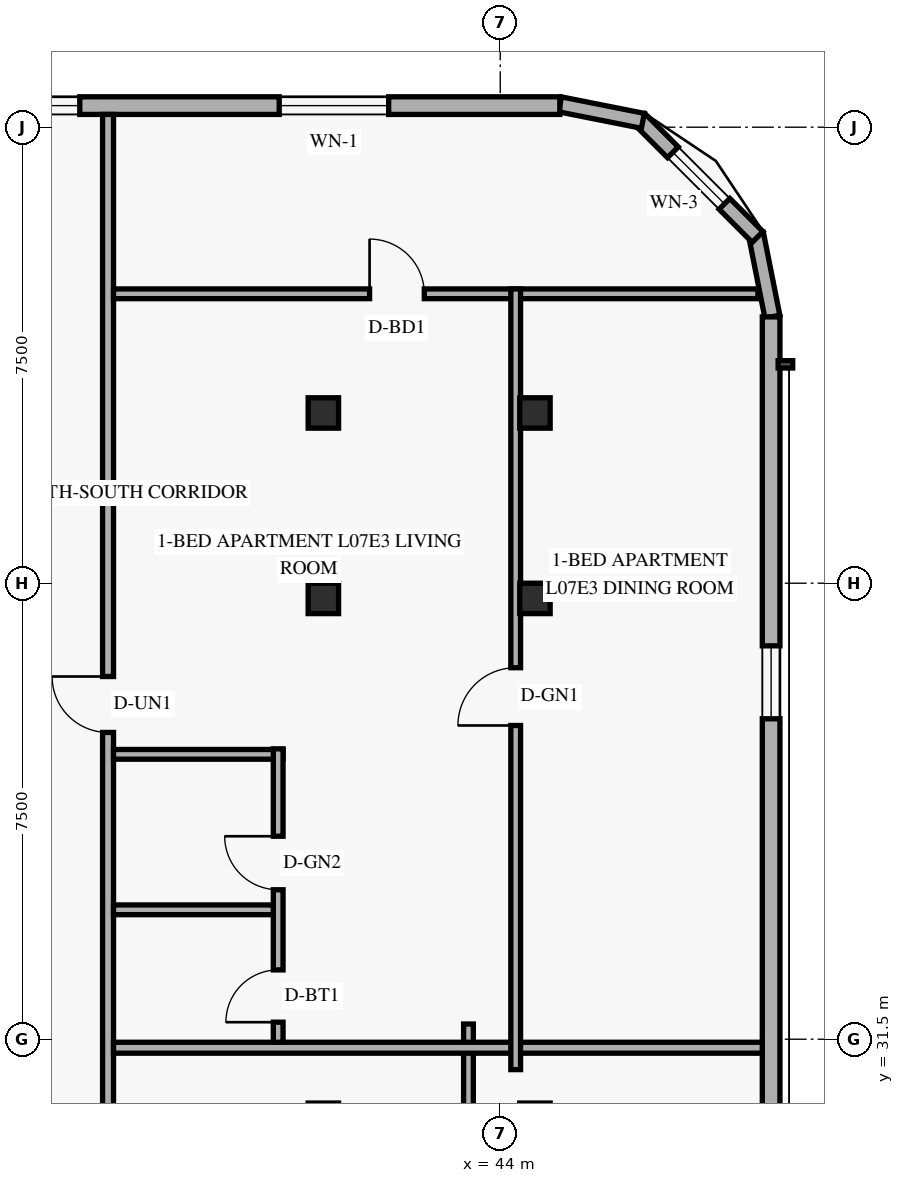
"""IFC4 building model, lengths in metres.
Left out: names, types, materials, properties, quantities, classifications, styles, units other than length and angle.
Written with IfcOpenShell. Run it as: python <this file> out.ifc"""

import sys

from ifc_helpers import new_model, si_unit, direction, frame, frame_2d, origin, origin_2d, place, context, subcontext, project, spatial, rectangle, hollow_rectangle, extrude, element, fill, save


model = new_model("IFC4")
c1 = context("Model", 3, precision=1e-05, world=origin(), true_north=direction((0.0, 1.0)))
c2 = subcontext(c1, "Body", "Model", "MODEL_VIEW")
j1 = project(units=[si_unit("LENGTHUNIT", "METRE"), si_unit("PLANEANGLEUNIT", "RADIAN")], contexts=[c1])
p1 = place(None, origin())
s1 = spatial("IfcSite", under=j1, at=p1, CompositionType="ELEMENT")
p2 = place(p1, origin())
s2 = spatial("IfcBuilding", under=s1, at=p2, CompositionType="ELEMENT")
p3 = place(p2, frame((0.0, 0.0, 31.2)))
s3 = spatial("IfcBuildingStorey", under=s2, at=p3, CompositionType="ELEMENT", Elevation=31.2)
for number, where, z_axis, x_axis in (
    (1, (41.028, 38.75, 0.0), (0.035, 0.0, 0.999), (0.0, 1.0, 0.0)),
    (2, (41.028, 41.8, 0.0), (0.035, 0.0, 0.999), (0.0, 1.0, 0.0)),
):
    element("IfcColumn", number, at=place(p3, frame(where, z_axis=z_axis, x_axis=x_axis)), inside=s3, PredefinedType="COLUMN", context=c2, shape_type="SweptSolid", body=[
        extrude(hollow_rectangle(XDim=0.5, YDim=0.5, WallThickness=0.022, at=origin_2d()), origin(), (0.0, 0.0, 1.0), 3.602),
    ])
for number, where, z_axis, x_axis in (
    (3, (44.466, 38.75, 0.0), (0.058, 0.0, 0.998), (0.0, 1.0, 0.0)),
    (4, (44.466, 41.8, 0.0), (0.058, 0.0, 0.998), (0.0, 1.0, 0.0)),
):
    element("IfcColumn", number, at=place(p3, frame(where, z_axis=z_axis, x_axis=x_axis)), inside=s3, PredefinedType="COLUMN", context=c2, shape_type="SweptSolid", body=[
        extrude(hollow_rectangle(XDim=0.5, YDim=0.5, WallThickness=0.022, at=origin_2d()), origin(), (0.0, 0.0, 1.0), 3.606),
    ])
p4 = place(p3, frame((48.476, 43.384, 0.0), z_axis=(0.0, 0.0, 1.0), x_axis=(-0.19496651342, 0.980809899341, 0.0)))
e5 = element("IfcWall", 5, at=p4, inside=s3, PredefinedType="SOLIDWALL", context=c2, shape_type="SweptSolid", body=[
    extrude(rectangle(XDim=1.389, YDim=0.25, at=frame_2d((0.694, 0.0))), origin(), (0.0, 0.0, 1.0), 3.36),
])
p5 = place(p3, frame((48.232, 44.695, 0.0), z_axis=(0.0, 0.0, 1.0), x_axis=(-0.707106781187, 0.707106781187, 0.0)))
e6 = element("IfcWall", 6, at=p5, inside=s3, PredefinedType="SOLIDWALL", context=c2, shape_type="SweptSolid", body=[
    extrude(rectangle(XDim=2.739, YDim=0.25, at=frame_2d((1.37, 0.0))), origin(), (0.0, 0.0, 1.0), 3.36),
])
p6 = place(p5, frame((0.77, 0.0, 0.85)))
e7 = element("IfcOpeningElement", 7, at=p6, cuts=e6, PredefinedType="OPENING", context=c2, shape_type="SweptSolid", body=[
    extrude(rectangle(XDim=1.2, YDim=1.5, at=frame_2d((0.6, 0.75))), frame((0.0, 0.135, 0.0), z_axis=(0.0, -1.0, 0.0), x_axis=(1.0, 0.0, 0.0)), (0.0, 0.0, 1.0), 0.27),
])
p7 = place(p3, frame((46.345, 46.605, 0.0), z_axis=(0.0, 0.0, 1.0), x_axis=(-0.980809899341, 0.19496651342, 0.0)))
e8 = element("IfcWall", 8, at=p7, inside=s3, PredefinedType="SOLIDWALL", context=c2, shape_type="SweptSolid", body=[
    extrude(rectangle(XDim=1.389, YDim=0.25, at=frame_2d((0.694, 0.0))), origin(), (0.0, 0.0, 1.0), 3.36),
])
p8 = place(p3, frame((48.455, 4.62, 0.0), z_axis=(0.0, 0.0, 1.0), x_axis=(0.0, 1.0, 0.0)))
e9 = element("IfcWall", 9, at=p8, inside=s3, PredefinedType="SOLIDWALL", context=c2, shape_type="SweptSolid", body=[
    extrude(rectangle(XDim=38.76, YDim=0.29, at=frame_2d((19.38, 0.0))), origin(), (0.0, 0.0, 1.0), 3.36),
])
p9 = place(p8, frame((4.95, 0.0, 0.85)))
e10 = element("IfcOpeningElement", 10, at=p9, cuts=e9, PredefinedType="OPENING", context=c2, shape_type="SweptSolid", body=[
    extrude(rectangle(XDim=1.2, YDim=1.5, at=frame_2d((0.6, 0.75))), frame((0.0, 0.155, 0.0), z_axis=(0.0, -1.0, 0.0), x_axis=(1.0, 0.0, 0.0)), (0.0, 0.0, 1.0), 0.31),
])
p10 = place(p8, frame((12.654, 0.0, 0.85)))
e11 = element("IfcOpeningElement", 11, at=p10, cuts=e9, PredefinedType="OPENING", context=c2, shape_type="SweptSolid", body=[
    extrude(rectangle(XDim=1.2, YDim=1.5, at=frame_2d((0.6, 0.75))), frame((0.0, 0.155, 0.0), z_axis=(0.0, -1.0, 0.0), x_axis=(1.0, 0.0, 0.0)), (0.0, 0.0, 1.0), 0.31),
])
p11 = place(p8, frame((18.479, 0.0, 0.85)))
e12 = element("IfcOpeningElement", 12, at=p11, cuts=e9, PredefinedType="OPENING", context=c2, shape_type="SweptSolid", body=[
    extrude(rectangle(XDim=1.2, YDim=1.5, at=frame_2d((0.6, 0.75))), frame((0.0, 0.155, 0.0), z_axis=(0.0, -1.0, 0.0), x_axis=(1.0, 0.0, 0.0)), (0.0, 0.0, 1.0), 0.31),
])
p12 = place(p8, frame((24.145, 0.0, 0.85)))
e13 = element("IfcOpeningElement", 13, at=p12, cuts=e9, PredefinedType="OPENING", context=c2, shape_type="SweptSolid", body=[
    extrude(rectangle(XDim=1.2, YDim=1.5, at=frame_2d((0.6, 0.75))), frame((0.0, 0.155, 0.0), z_axis=(0.0, -1.0, 0.0), x_axis=(1.0, 0.0, 0.0)), (0.0, 0.0, 1.0), 0.31),
])
p13 = place(p8, frame((32.15, 0.0, 0.85)))
e14 = element("IfcOpeningElement", 14, at=p13, cuts=e9, PredefinedType="OPENING", context=c2, shape_type="SweptSolid", body=[
    extrude(rectangle(XDim=1.2, YDim=1.5, at=frame_2d((0.6, 0.75))), frame((0.0, 0.155, 0.0), z_axis=(0.0, -1.0, 0.0), x_axis=(1.0, 0.0, 0.0)), (0.0, 0.0, 1.0), 0.31),
])
p14 = place(p3, frame((44.98, 46.855, 0.0), z_axis=(0.0, 0.0, 1.0), x_axis=(-1.0, 0.0, 0.0)))
e15 = element("IfcWall", 15, at=p14, inside=s3, PredefinedType="SOLIDWALL", context=c2, shape_type="SweptSolid", body=[
    extrude(rectangle(XDim=39.56, YDim=0.29, at=frame_2d((19.78, 0.0))), origin(), (0.0, 0.0, 1.0), 3.36),
])
p15 = place(p14, frame((35.22, 0.0, 0.85)))
e16 = element("IfcOpeningElement", 16, at=p15, cuts=e15, PredefinedType="OPENING", context=c2, shape_type="SweptSolid", body=[
    extrude(rectangle(XDim=1.8, YDim=1.6, at=frame_2d((0.9, 0.8))), frame((0.0, 0.155, 0.0), z_axis=(0.0, -1.0, 0.0), x_axis=(1.0, 0.0, 0.0)), (0.0, 0.0, 1.0), 0.31),
])
p16 = place(p14, frame((31.18, 0.0, 0.85)))
e17 = element("IfcOpeningElement", 17, at=p16, cuts=e15, PredefinedType="OPENING", context=c2, shape_type="SweptSolid", body=[
    extrude(rectangle(XDim=1.2, YDim=1.5, at=frame_2d((0.6, 0.75))), frame((0.0, 0.155, 0.0), z_axis=(0.0, -1.0, 0.0), x_axis=(1.0, 0.0, 0.0)), (0.0, 0.0, 1.0), 0.31),
])
p17 = place(p14, frame((26.625, 0.0, 0.85)))
e18 = element("IfcOpeningElement", 18, at=p17, cuts=e15, PredefinedType="OPENING", context=c2, shape_type="SweptSolid", body=[
    extrude(rectangle(XDim=1.8, YDim=1.6, at=frame_2d((0.9, 0.8))), frame((0.0, 0.155, 0.0), z_axis=(0.0, -1.0, 0.0), x_axis=(1.0, 0.0, 0.0)), (0.0, 0.0, 1.0), 0.31),
])
p18 = place(p14, frame((21.2, 0.0, 0.85)))
e19 = element("IfcOpeningElement", 19, at=p18, cuts=e15, PredefinedType="OPENING", context=c2, shape_type="SweptSolid", body=[
    extrude(rectangle(XDim=1.8, YDim=1.6, at=frame_2d((0.9, 0.8))), frame((0.0, 0.155, 0.0), z_axis=(0.0, -1.0, 0.0), x_axis=(1.0, 0.0, 0.0)), (0.0, 0.0, 1.0), 0.31),
])
p19 = place(p14, frame((15.965, 0.0, 0.85)))
e20 = element("IfcOpeningElement", 20, at=p19, cuts=e15, PredefinedType="OPENING", context=c2, shape_type="SweptSolid", body=[
    extrude(rectangle(XDim=1.8, YDim=1.6, at=frame_2d((0.9, 0.8))), frame((0.0, 0.155, 0.0), z_axis=(0.0, -1.0, 0.0), x_axis=(1.0, 0.0, 0.0)), (0.0, 0.0, 1.0), 0.31),
])
p20 = place(p14, frame((10.73, 0.0, 0.85)))
e21 = element("IfcOpeningElement", 21, at=p20, cuts=e15, PredefinedType="OPENING", context=c2, shape_type="SweptSolid", body=[
    extrude(rectangle(XDim=1.8, YDim=1.6, at=frame_2d((0.9, 0.8))), frame((0.0, 0.155, 0.0), z_axis=(0.0, -1.0, 0.0), x_axis=(1.0, 0.0, 0.0)), (0.0, 0.0, 1.0), 0.31),
])
p21 = place(p14, frame((7.895, 0.0, 0.85)))
e22 = element("IfcOpeningElement", 22, at=p21, cuts=e15, PredefinedType="OPENING", context=c2, shape_type="SweptSolid", body=[
    extrude(rectangle(XDim=1.2, YDim=1.5, at=frame_2d((0.6, 0.75))), frame((0.0, 0.155, 0.0), z_axis=(0.0, -1.0, 0.0), x_axis=(1.0, 0.0, 0.0)), (0.0, 0.0, 1.0), 0.31),
])
p22 = place(p14, frame((2.815, 0.0, 0.85)))
e23 = element("IfcOpeningElement", 23, at=p22, cuts=e15, PredefinedType="OPENING", context=c2, shape_type="SweptSolid", body=[
    extrude(rectangle(XDim=1.8, YDim=1.6, at=frame_2d((0.9, 0.8))), frame((0.0, 0.155, 0.0), z_axis=(0.0, -1.0, 0.0), x_axis=(1.0, 0.0, 0.0)), (0.0, 0.0, 1.0), 0.31),
])
p23 = place(p3, frame((37.55, 1.29, 0.0), z_axis=(0.0, 0.0, 1.0), x_axis=(0.0, 1.0, 0.0)))
e24 = element("IfcWall", 24, at=p23, inside=s3, PredefinedType="STANDARD", context=c2, shape_type="SweptSolid", body=[
    extrude(rectangle(XDim=45.42, YDim=0.18, at=frame_2d((22.71, 0.0))), origin(), (0.0, 0.0, 1.0), 2.649),
])
p24 = place(p23, frame((8.49, 0.0, 0.0)))
e25 = element("IfcOpeningElement", 25, at=p24, cuts=e24, PredefinedType="OPENING", context=c2, shape_type="SweptSolid", body=[
    extrude(rectangle(XDim=0.92, YDim=2.15, at=frame_2d((0.46, 1.075))), frame((0.0, 0.1, 0.0), z_axis=(0.0, -1.0, 0.0), x_axis=(1.0, 0.0, 0.0)), (0.0, 0.0, 1.0), 0.2),
])
p25 = place(p23, frame((20.073, 0.0, 0.0)))
e26 = element("IfcOpeningElement", 26, at=p25, cuts=e24, PredefinedType="OPENING", context=c2, shape_type="SweptSolid", body=[
    extrude(rectangle(XDim=0.92, YDim=2.15, at=frame_2d((0.46, 1.075))), frame((0.0, 0.1, 0.0), z_axis=(0.0, -1.0, 0.0), x_axis=(1.0, 0.0, 0.0)), (0.0, 0.0, 1.0), 0.2),
])
p26 = place(p23, frame((35.256, 0.0, 0.0)))
e27 = element("IfcOpeningElement", 27, at=p26, cuts=e24, PredefinedType="OPENING", context=c2, shape_type="SweptSolid", body=[
    extrude(rectangle(XDim=0.92, YDim=2.15, at=frame_2d((0.46, 1.075))), frame((0.0, 0.1, 0.0), z_axis=(0.0, -1.0, 0.0), x_axis=(1.0, 0.0, 0.0)), (0.0, 0.0, 1.0), 0.2),
])
p27 = place(p3, frame((43.477, 27.29, 0.0), z_axis=(0.0, 0.0, 1.0), x_axis=(0.0, 1.0, 0.0)))
e28 = element("IfcWall", 28, at=p27, inside=s3, PredefinedType="PARTITIONING", context=c2, shape_type="SweptSolid", body=[
    extrude(rectangle(XDim=4.46, YDim=0.16, at=frame_2d((2.23, 0.0))), origin(), (0.0, 0.0, 1.0), 2.649),
])
p28 = place(p3, frame((37.64, 31.36, 0.0), z_axis=(0.0, 0.0, 1.0), x_axis=(1.0, 0.0, 0.0)))
e29 = element("IfcWall", 29, at=p28, inside=s3, PredefinedType="PARTITIONING", context=c2, shape_type="SweptSolid", body=[
    extrude(rectangle(XDim=10.67, YDim=0.18, at=frame_2d((5.335, 0.0))), origin(), (0.0, 0.0, 1.0), 2.649),
])
p29 = place(p3, frame((37.64, 43.76, 0.0), z_axis=(0.0, 0.0, 1.0), x_axis=(1.0, 0.0, 0.0)))
e30 = element("IfcWall", 30, at=p29, inside=s3, PredefinedType="PARTITIONING", context=c2, shape_type="SweptSolid", body=[
    extrude(rectangle(XDim=10.598, YDim=0.16, at=frame_2d((5.299, 0.0))), origin(), (0.0, 0.0, 1.0), 3.36),
])
p30 = place(p29, frame((4.211, 0.0, 0.0)))
e31 = element("IfcOpeningElement", 31, at=p30, cuts=e30, PredefinedType="OPENING", context=c2, shape_type="SweptSolid", body=[
    extrude(rectangle(XDim=0.9, YDim=2.14, at=frame_2d((0.45, 1.07))), frame((0.0, 0.09, 0.0), z_axis=(0.0, -1.0, 0.0), x_axis=(1.0, 0.0, 0.0)), (0.0, 0.0, 1.0), 0.18),
])
p31 = place(p3, frame((37.64, 36.186, 0.0), z_axis=(0.0, 0.0, 1.0), x_axis=(1.0, 0.0, 0.0)))
e32 = element("IfcWall", 32, at=p31, inside=s3, PredefinedType="PLUMBINGWALL", context=c2, shape_type="SweptSolid", body=[
    extrude(rectangle(XDim=2.788, YDim=0.16, at=frame_2d((1.394, 0.0))), origin(), (0.0, 0.0, 1.0), 3.36),
])
p32 = place(p3, frame((40.348, 31.45, 0.0), z_axis=(0.0, 0.0, 1.0), x_axis=(0.0, 1.0, 0.0)))
e33 = element("IfcWall", 33, at=p32, inside=s3, PredefinedType="PLUMBINGWALL", context=c2, shape_type="SweptSolid", body=[
    extrude(rectangle(XDim=4.825, YDim=0.16, at=frame_2d((2.413, 0.0))), origin(), (0.0, 0.0, 1.0), 2.932),
])
p33 = place(p32, frame((0.33, 0.0, 0.0)))
e34 = element("IfcOpeningElement", 34, at=p33, cuts=e33, PredefinedType="OPENING", context=c2, shape_type="SweptSolid", body=[
    extrude(rectangle(XDim=0.86, YDim=2.12, at=frame_2d((0.43, 1.06))), frame((0.0, 0.09, 0.0), z_axis=(0.0, -1.0, 0.0), x_axis=(1.0, 0.0, 0.0)), (0.0, 0.0, 1.0), 0.18),
])
p34 = place(p32, frame((2.508, 0.0, 0.0)))
e35 = element("IfcOpeningElement", 35, at=p34, cuts=e33, PredefinedType="OPENING", context=c2, shape_type="SweptSolid", body=[
    extrude(rectangle(XDim=0.88, YDim=2.12, at=frame_2d((0.44, 1.06))), frame((0.0, 0.09, 0.0), z_axis=(0.0, -1.0, 0.0), x_axis=(1.0, 0.0, 0.0)), (0.0, 0.0, 1.0), 0.18),
])
p35 = place(p3, frame((37.64, 33.628, 0.0), z_axis=(0.0, 0.0, 1.0), x_axis=(1.0, 0.0, 0.0)))
e36 = element("IfcWall", 36, at=p35, inside=s3, PredefinedType="PLUMBINGWALL", context=c2, shape_type="SweptSolid", body=[
    extrude(rectangle(XDim=2.628, YDim=0.16, at=frame_2d((1.314, 0.0))), origin(), (0.0, 0.0, 1.0), 3.36),
])
p36 = place(p3, frame((44.254, 31.0, 0.0), z_axis=(0.0, 0.0, 1.0), x_axis=(0.0, 1.0, 0.0)))
e37 = element("IfcWall", 37, at=p36, inside=s3, PredefinedType="PARTITIONING", context=c2, shape_type="SweptSolid", body=[
    extrude(rectangle(XDim=12.84, YDim=0.16, at=frame_2d((6.42, 0.0))), origin(), (0.0, 0.0, 1.0), 2.649),
])
p37 = place(p36, frame((5.66, 0.0, 0.0)))
e38 = element("IfcOpeningElement", 38, at=p37, cuts=e37, PredefinedType="OPENING", context=c2, shape_type="SweptSolid", body=[
    extrude(rectangle(XDim=0.95, YDim=2.15, at=frame_2d((0.475, 1.075))), frame((0.0, 0.09, 0.0), z_axis=(0.0, -1.0, 0.0), x_axis=(1.0, 0.0, 0.0)), (0.0, 0.0, 1.0), 0.18),
])
p38 = place(p6, origin())
e39 = element("IfcWindow", 39, at=p38, inside=s3, PartitioningType="SINGLE_PANEL", PredefinedType="WINDOW", context=c2, shape_type="SweptSolid", body=[
    extrude(rectangle(XDim=1.2, YDim=1.5, at=frame_2d((0.6, 0.75))), frame((0.0, 0.03, 0.0), z_axis=(0.0, -1.0, 0.0), x_axis=(1.0, 0.0, 0.0)), (0.0, 0.0, 1.0), 0.06),
])
fill(e7, e39)
p39 = place(p13, origin())
e40 = element("IfcWindow", 40, at=p39, inside=s3, PartitioningType="SINGLE_PANEL", PredefinedType="WINDOW", context=c2, shape_type="SweptSolid", body=[
    extrude(rectangle(XDim=1.2, YDim=1.5, at=frame_2d((0.6, 0.75))), frame((0.0, 0.03, 0.0), z_axis=(0.0, -1.0, 0.0), x_axis=(1.0, 0.0, 0.0)), (0.0, 0.0, 1.0), 0.06),
])
fill(e14, e40)
p40 = place(p21, origin())
e41 = element("IfcWindow", 41, at=p40, inside=s3, PartitioningType="SINGLE_PANEL", PredefinedType="WINDOW", context=c2, shape_type="SweptSolid", body=[
    extrude(rectangle(XDim=1.2, YDim=1.5, at=frame_2d((0.6, 0.75))), frame((0.0, 0.03, 0.0), z_axis=(0.0, -1.0, 0.0), x_axis=(1.0, 0.0, 0.0)), (0.0, 0.0, 1.0), 0.06),
])
fill(e22, e41)
p41 = place(p22, origin())
e42 = element("IfcWindow", 42, at=p41, inside=s3, PartitioningType="SINGLE_PANEL", PredefinedType="WINDOW", context=c2, shape_type="SweptSolid", body=[
    extrude(rectangle(XDim=1.8, YDim=1.6, at=frame_2d((0.9, 0.8))), frame((0.0, 0.03, 0.0), z_axis=(0.0, -1.0, 0.0), x_axis=(1.0, 0.0, 0.0)), (0.0, 0.0, 1.0), 0.06),
])
fill(e23, e42)
p42 = place(p37, origin())
e43 = element("IfcDoor", 43, at=p42, inside=s3, OperationType="SINGLE_SWING_LEFT", PredefinedType="DOOR", context=c2, shape_type="SweptSolid", body=[
    extrude(rectangle(XDim=0.95, YDim=2.15, at=frame_2d((0.475, 1.075))), frame((0.0, 0.025, 0.0), z_axis=(0.0, -1.0, 0.0), x_axis=(1.0, 0.0, 0.0)), (0.0, 0.0, 1.0), 0.05),
])
fill(e38, e43)
p43 = place(p26, origin())
e44 = element("IfcDoor", 44, at=p43, inside=s3, OperationType="SINGLE_SWING_RIGHT", PredefinedType="DOOR", context=c2, shape_type="SweptSolid", body=[
    extrude(rectangle(XDim=0.92, YDim=2.15, at=frame_2d((0.46, 1.075))), frame((0.0, 0.025, 0.0), z_axis=(0.0, -1.0, 0.0), x_axis=(1.0, 0.0, 0.0)), (0.0, 0.0, 1.0), 0.05),
])
fill(e27, e44)
p44 = place(p33, origin())
e45 = element("IfcDoor", 45, at=p44, inside=s3, OperationType="SINGLE_SWING_LEFT", PredefinedType="DOOR", context=c2, shape_type="SweptSolid", body=[
    extrude(rectangle(XDim=0.86, YDim=2.12, at=frame_2d((0.43, 1.06))), frame((0.0, 0.025, 0.0), z_axis=(0.0, -1.0, 0.0), x_axis=(1.0, 0.0, 0.0)), (0.0, 0.0, 1.0), 0.05),
])
fill(e34, e45)
p45 = place(p34, origin())
e46 = element("IfcDoor", 46, at=p45, inside=s3, OperationType="SINGLE_SWING_RIGHT", PredefinedType="DOOR", context=c2, shape_type="SweptSolid", body=[
    extrude(rectangle(XDim=0.88, YDim=2.12, at=frame_2d((0.44, 1.06))), frame((0.0, 0.025, 0.0), z_axis=(0.0, -1.0, 0.0), x_axis=(1.0, 0.0, 0.0)), (0.0, 0.0, 1.0), 0.05),
])
fill(e35, e46)
p46 = place(p30, origin())
e47 = element("IfcDoor", 47, at=p46, inside=s3, OperationType="SINGLE_SWING_LEFT", PredefinedType="DOOR", context=c2, shape_type="SweptSolid", body=[
    extrude(rectangle(XDim=0.9, YDim=2.14, at=frame_2d((0.45, 1.07))), frame((0.0, 0.025, 0.0), z_axis=(0.0, -1.0, 0.0), x_axis=(1.0, 0.0, 0.0)), (0.0, 0.0, 1.0), 0.05),
])
fill(e31, e47)
save(model, sys.argv[1])
